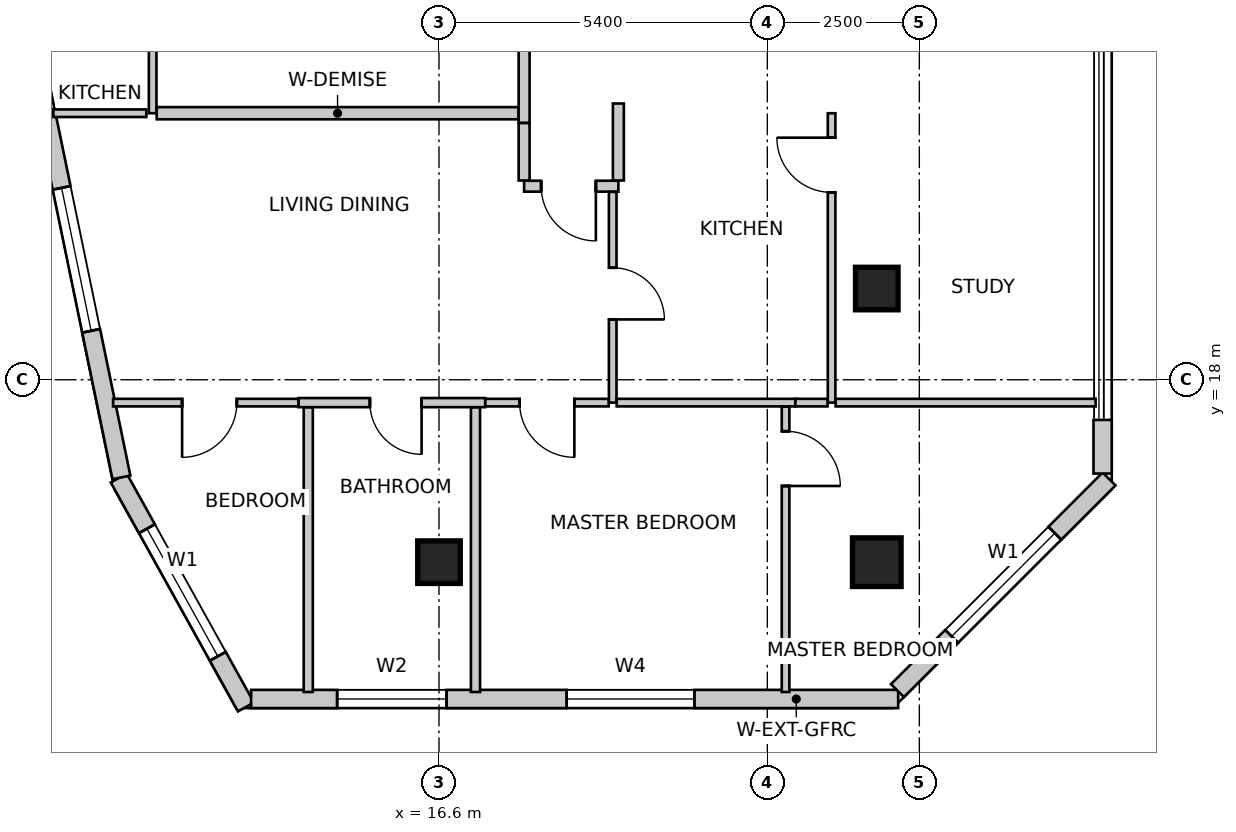
"""IFC4 building model, lengths in metres.
Left out: names, types, materials, properties, quantities, classifications, styles, units other than length and angle.
Written with IfcOpenShell. Run it as: python <this file> out.ifc"""

import sys

from ifc_helpers import new_model, si_unit, direction, frame, frame_2d, origin, origin_2d, place, context, subcontext, project, spatial, rectangle, extrude, source, transform, mapped, element, fill, save


model = new_model("IFC4")
c1 = context("Model", 3, precision=1e-05, world=origin(), true_north=direction((0.0, 1.0)))
c2 = subcontext(c1, "Body", "Model", "MODEL_VIEW")
j1 = project(units=[si_unit("LENGTHUNIT", "METRE"), si_unit("PLANEANGLEUNIT", "RADIAN")], contexts=[c1])
p1 = place(None, origin())
s1 = spatial("IfcSite", under=j1, at=p1, CompositionType="ELEMENT")
p2 = place(p1, origin())
s2 = spatial("IfcBuilding", under=s1, at=p2, CompositionType="ELEMENT")
p3 = place(p2, frame((0.0, 0.0, 218.4)))
s3 = spatial("IfcBuildingStorey", under=s2, at=p3, CompositionType="ELEMENT", Elevation=218.4)
m1 = source(origin(), c2, "Body", "SweptSolid", [
    extrude(rectangle(XDim=0.7, YDim=0.7, at=origin_2d()), origin(), (0.0, 0.0, 1.0), 3.5),
])
p4 = place(p3, frame((23.8, 19.5, 0.0), z_axis=(0.0, 0.0, 1.0), x_axis=(1.0, 0.0, 0.0)))
e1 = element("IfcColumn", 1, at=p4, inside=s3, PredefinedType="COLUMN", context=c2, shape_type="MappedRepresentation", body=[
    mapped(m1, transform((0.0, 0.0, 0.0), scale=1.0)),
])
m2 = source(origin(), c2, "Body", "SweptSolid", [
    extrude(rectangle(XDim=0.8, YDim=0.8, at=origin_2d()), origin(), (0.0, 0.0, 1.0), 3.5),
])
p5 = place(p3, frame((23.8, 15.0, 0.0), z_axis=(0.0, 0.0, 1.0), x_axis=(1.0, 0.0, 0.0)))
e2 = element("IfcColumn", 2, at=p5, inside=s3, PredefinedType="COLUMN", context=c2, shape_type="MappedRepresentation", body=[
    mapped(m2, transform((0.0, 0.0, 0.0), scale=1.0)),
])
p6 = place(p3, frame((16.6, 15.0, 0.0), z_axis=(0.0, 0.0, 1.0), x_axis=(1.0, 0.0, 0.0)))
e3 = element("IfcColumn", 3, at=p6, inside=s3, PredefinedType="COLUMN", context=c2, shape_type="MappedRepresentation", body=[
    mapped(m1, transform((0.0, 0.0, 0.0), scale=1.0)),
])
p7 = place(p3, frame((11.333, 16.384, 0.0), z_axis=(0.0, 0.0, 1.0), x_axis=(0.485633305139, -0.874162623852, 0.0)))
e4 = element("IfcWall", 4, at=p7, inside=s3, PredefinedType="SOLIDWALL", context=c2, shape_type="SweptSolid", body=[
    extrude(rectangle(XDim=4.307, YDim=0.3, at=frame_2d((2.153, 0.0))), origin(), (0.0, 0.0, 1.0), 3.25),
])
m3 = source(origin(), c2, "Body", "SweptSolid", [
    extrude(rectangle(XDim=2.4, YDim=2.2, at=frame_2d((1.2, 1.1))), frame((0.0, 0.16, 0.0), z_axis=(0.0, -1.0, 0.0), x_axis=(1.0, 0.0, 0.0)), (0.0, 0.0, 1.0), 0.32),
])
p8 = place(p7, frame((0.954, 0.0, 0.85)))
e5 = element("IfcOpeningElement", 5, at=p8, cuts=e4, PredefinedType="OPENING", context=c2, shape_type="MappedRepresentation", body=[
    mapped(m3, transform((0.0, 0.0, 0.0), scale=1.0)),
])
p9 = place(p3, frame((13.51, 12.75, 0.0), z_axis=(0.0, 0.0, 1.0), x_axis=(1.0, 0.0, 0.0)))
e6 = element("IfcWall", 6, at=p9, inside=s3, PredefinedType="SOLIDWALL", context=c2, shape_type="SweptSolid", body=[
    extrude(rectangle(XDim=10.642, YDim=0.3, at=frame_2d((5.321, 0.0))), origin(), (0.0, 0.0, 1.0), 3.25),
])
m4 = source(origin(), c2, "Body", "SweptSolid", [
    extrude(rectangle(XDim=1.8, YDim=2.1, at=frame_2d((0.9, 1.05))), frame((0.0, 0.16, 0.0), z_axis=(0.0, -1.0, 0.0), x_axis=(1.0, 0.0, 0.0)), (0.0, 0.0, 1.0), 0.32),
])
p10 = place(p9, frame((1.415, 0.0, 0.85)))
e7 = element("IfcOpeningElement", 7, at=p10, cuts=e6, PredefinedType="OPENING", context=c2, shape_type="MappedRepresentation", body=[
    mapped(m4, transform((0.0, 0.0, 0.0), scale=1.0)),
])
m5 = source(origin(), c2, "Body", "SweptSolid", [
    extrude(rectangle(XDim=2.1, YDim=2.0, at=frame_2d((1.05, 1.0))), frame((0.0, 0.16, 0.0), z_axis=(0.0, -1.0, 0.0), x_axis=(1.0, 0.0, 0.0)), (0.0, 0.0, 1.0), 0.32),
])
p11 = place(p9, frame((5.19, 0.0, 0.85)))
e8 = element("IfcOpeningElement", 8, at=p11, cuts=e6, PredefinedType="OPENING", context=c2, shape_type="MappedRepresentation", body=[
    mapped(m5, transform((0.0, 0.0, 0.0), scale=1.0)),
])
p12 = place(p3, frame((24.14, 12.888, 0.0), z_axis=(0.0, 0.0, 1.0), x_axis=(0.707106781187, 0.707106781187, 0.0)))
e9 = element("IfcWall", 9, at=p12, inside=s3, PredefinedType="SOLIDWALL", context=c2, shape_type="SweptSolid", body=[
    extrude(rectangle(XDim=4.922, YDim=0.3, at=frame_2d((2.461, 0.0))), origin(), (0.0, 0.0, 1.0), 3.25),
])
p13 = place(p12, frame((1.261, 0.0, 0.85)))
e10 = element("IfcOpeningElement", 10, at=p13, cuts=e9, PredefinedType="OPENING", context=c2, shape_type="MappedRepresentation", body=[
    mapped(m3, transform((0.0, 0.0, 0.0), scale=1.0)),
])
p14 = place(p3, frame((27.514, 16.457, 0.0), z_axis=(0.0, 0.0, 1.0), x_axis=(0.0, 1.0, 0.0)))
e11 = element("IfcWall", 11, at=p14, inside=s3, PredefinedType="SOLIDWALL", context=c2, shape_type="SweptSolid", body=[
    extrude(rectangle(XDim=0.882, YDim=0.3, at=frame_2d((0.441, 0.0))), origin(), (0.0, 0.0, 1.0), 3.25),
])
p15 = place(p3, frame((8.188, 31.834, 0.0), z_axis=(0.0, 0.0, 1.0), x_axis=(0.202303475707, -0.979322880217, 0.0)))
e12 = element("IfcWall", 12, at=p15, inside=s3, PredefinedType="SOLIDWALL", context=c2, shape_type="SweptSolid", body=[
    extrude(rectangle(XDim=15.766, YDim=0.3, at=frame_2d((7.883, 0.0))), origin(), (0.0, 0.0, 1.0), 3.25),
])
p16 = place(p15, frame((1.257, 0.0, 0.85)))
e13 = element("IfcOpeningElement", 13, at=p16, cuts=e12, PredefinedType="OPENING", context=c2, shape_type="MappedRepresentation", body=[
    mapped(m3, transform((0.0, 0.0, 0.0), scale=1.0)),
])
p17 = place(p15, frame((6.044, 0.0, 0.85)))
e14 = element("IfcOpeningElement", 14, at=p17, cuts=e12, PredefinedType="OPENING", context=c2, shape_type="MappedRepresentation", body=[
    mapped(m3, transform((0.0, 0.0, 0.0), scale=1.0)),
])
p18 = place(p15, frame((10.904, 0.0, 0.85)))
e15 = element("IfcOpeningElement", 15, at=p18, cuts=e12, PredefinedType="OPENING", context=c2, shape_type="MappedRepresentation", body=[
    mapped(m3, transform((0.0, 0.0, 0.0), scale=1.0)),
])
p19 = place(p3, frame((18.0, 22.223, 0.0), z_axis=(0.0, 0.0, 1.0), x_axis=(0.0, 1.0, 0.0)))
e16 = element("IfcWall", 16, at=p19, inside=s3, PredefinedType="PARTITIONING", context=c2, shape_type="SweptSolid", body=[
    extrude(rectangle(XDim=5.079, YDim=0.18, at=frame_2d((2.54, 0.0))), origin(), (0.0, 0.0, 1.0), 2.766),
])
m6 = source(origin(), c2, "Body", "SweptSolid", [
    extrude(rectangle(XDim=0.9, YDim=2.15, at=frame_2d((0.45, 1.075))), frame((0.0, 0.1, 0.0), z_axis=(0.0, -1.0, 0.0), x_axis=(1.0, 0.0, 0.0)), (0.0, 0.0, 1.0), 0.2),
])
p20 = place(p19, frame((2.09, 0.0, 0.0)))
e17 = element("IfcOpeningElement", 17, at=p20, cuts=e16, PredefinedType="OPENING", context=c2, shape_type="MappedRepresentation", body=[
    mapped(m6, transform((0.0, 0.0, 0.0), scale=1.0)),
])
p21 = place(p3, frame((19.55, 21.183, 0.0), z_axis=(0.0, 0.0, 1.0), x_axis=(-1.0, 0.0, 0.0)))
e18 = element("IfcWall", 18, at=p21, inside=s3, PredefinedType="PARTITIONING", context=c2, shape_type="SweptSolid", body=[
    extrude(rectangle(XDim=1.55, YDim=0.18, at=frame_2d((0.775, 0.0))), origin(), (0.0, 0.0, 1.0), 2.779),
])
p22 = place(p21, frame((0.37, 0.0, 0.0)))
e19 = element("IfcOpeningElement", 19, at=p22, cuts=e18, PredefinedType="OPENING", context=c2, shape_type="MappedRepresentation", body=[
    mapped(m6, transform((0.0, 0.0, 0.0), scale=1.0)),
])
p23 = place(p3, frame((18.0, 21.277, 0.0), z_axis=(0.0, 0.0, 1.0), x_axis=(0.0, 1.0, 0.0)))
e20 = element("IfcWall", 20, at=p23, inside=s3, PredefinedType="PARTITIONING", context=c2, shape_type="SweptSolid", body=[
    extrude(rectangle(XDim=0.944, YDim=0.18, at=frame_2d((0.472, 0.0))), origin(), (0.0, 0.0, 1.0), 2.779),
])
p24 = place(p3, frame((19.55, 22.543, 0.0), z_axis=(0.0, 0.0, 1.0), x_axis=(0.0, -1.0, 0.0)))
e21 = element("IfcWall", 21, at=p24, inside=s3, PredefinedType="PARTITIONING", context=c2, shape_type="SweptSolid", body=[
    extrude(rectangle(XDim=1.266, YDim=0.18, at=frame_2d((0.633, 0.0))), origin(), (0.0, 0.0, 1.0), 3.25),
])
p25 = place(p3, frame((11.891, 22.383, 0.0), z_axis=(0.0, 0.0, 1.0), x_axis=(0.0, 1.0, 0.0)))
e22 = element("IfcWall", 22, at=p25, inside=s3, PredefinedType="PARTITIONING", context=c2, shape_type="SweptSolid", body=[
    extrude(rectangle(XDim=4.759, YDim=0.125, at=frame_2d((2.379, 0.0))), origin(), (0.0, 0.0, 1.0), 2.766),
])
m7 = source(origin(), c2, "Body", "SweptSolid", [
    extrude(rectangle(XDim=0.85, YDim=2.15, at=frame_2d((0.425, 1.075))), frame((0.0, 0.073, 0.0), z_axis=(0.0, -1.0, 0.0), x_axis=(1.0, 0.0, 0.0)), (0.0, 0.0, 1.0), 0.145),
])
p26 = place(p25, frame((3.257, 0.0, 0.0)))
e23 = element("IfcOpeningElement", 23, at=p26, cuts=e22, PredefinedType="OPENING", context=c2, shape_type="MappedRepresentation", body=[
    mapped(m7, transform((0.0, 0.0, 0.0), scale=1.0)),
])
p27 = place(p3, frame((17.906, 22.383, 0.0), z_axis=(0.0, 0.0, 1.0), x_axis=(-1.0, 0.0, 0.0)))
e24 = element("IfcWall", 24, at=p27, inside=s3, PredefinedType="PARTITIONING", context=c2, shape_type="SweptSolid", body=[
    extrude(rectangle(XDim=5.948, YDim=0.2, at=frame_2d((2.974, 0.0))), origin(), (0.0, 0.0, 1.0), 2.779),
])
p28 = place(p3, frame((11.787, 22.383, 0.0), z_axis=(0.0, 0.0, 1.0), x_axis=(-1.0, 0.0, 0.0)))
e25 = element("IfcWall", 25, at=p28, inside=s3, PredefinedType="PARTITIONING", context=c2, shape_type="SweptSolid", body=[
    extrude(rectangle(XDim=1.53, YDim=0.125, at=frame_2d((0.765, 0.0))), origin(), (0.0, 0.0, 1.0), 3.25),
])
p29 = place(p3, frame((23.057, 17.624, 0.0), z_axis=(0.0, 0.0, 1.0), x_axis=(0.0, 1.0, 0.0)))
e26 = element("IfcWall", 26, at=p29, inside=s3, PredefinedType="PARTITIONING", context=c2, shape_type="SweptSolid", body=[
    extrude(rectangle(XDim=4.759, YDim=0.125, at=frame_2d((2.379, 0.0))), origin(), (0.0, 0.0, 1.0), 2.779),
])
m8 = source(origin(), c2, "Body", "SweptSolid", [
    extrude(rectangle(XDim=0.9, YDim=2.15, at=frame_2d((0.45, 1.075))), frame((0.0, 0.073, 0.0), z_axis=(0.0, -1.0, 0.0), x_axis=(1.0, 0.0, 0.0)), (0.0, 0.0, 1.0), 0.145),
])
p30 = place(p29, frame((3.457, 0.0, 0.0)))
e27 = element("IfcOpeningElement", 27, at=p30, cuts=e26, PredefinedType="OPENING", context=c2, shape_type="MappedRepresentation", body=[
    mapped(m8, transform((0.0, 0.0, 0.0), scale=1.0)),
])
p31 = place(p3, frame((27.399, 17.624, 0.0), z_axis=(0.0, 0.0, 1.0), x_axis=(-1.0, 0.0, 0.0)))
e28 = element("IfcWall", 28, at=p31, inside=s3, PredefinedType="PARTITIONING", context=c2, shape_type="SweptSolid", body=[
    extrude(rectangle(XDim=4.275, YDim=0.125, at=frame_2d((2.138, 0.0))), origin(), (0.0, 0.0, 1.0), 2.542),
])
p32 = place(p3, frame((19.457, 21.089, 0.0), z_axis=(0.0, 0.0, 1.0), x_axis=(0.0, -1.0, 0.0)))
e29 = element("IfcWall", 29, at=p32, inside=s3, PredefinedType="PARTITIONING", context=c2, shape_type="SweptSolid", body=[
    extrude(rectangle(XDim=3.465, YDim=0.125, at=frame_2d((1.732, 0.0))), origin(), (0.0, 0.0, 1.0), 2.779),
])
p33 = place(p32, frame((1.247, 0.0, 0.0)))
e30 = element("IfcOpeningElement", 30, at=p33, cuts=e29, PredefinedType="OPENING", context=c2, shape_type="MappedRepresentation", body=[
    mapped(m7, transform((0.0, 0.0, 0.0), scale=1.0)),
])
p34 = place(p3, frame((17.36, 17.624, 0.0), z_axis=(0.0, 0.0, 1.0), x_axis=(-1.0, 0.0, 0.0)))
e31 = element("IfcWall", 31, at=p34, inside=s3, PredefinedType="PARTITIONING", context=c2, shape_type="SweptSolid", body=[
    extrude(rectangle(XDim=3.07, YDim=0.15, at=frame_2d((1.535, 0.0))), origin(), (0.0, 0.0, 1.0), 3.25),
])
m9 = source(origin(), c2, "Body", "SweptSolid", [
    extrude(rectangle(XDim=0.85, YDim=2.15, at=frame_2d((0.425, 1.075))), frame((0.0, 0.085, 0.0), z_axis=(0.0, -1.0, 0.0), x_axis=(1.0, 0.0, 0.0)), (0.0, 0.0, 1.0), 0.17),
])
p35 = place(p34, frame((1.046, 0.0, 0.0)))
e32 = element("IfcOpeningElement", 32, at=p35, cuts=e31, PredefinedType="OPENING", context=c2, shape_type="MappedRepresentation", body=[
    mapped(m9, transform((0.0, 0.0, 0.0), scale=1.0)),
])
p36 = place(p3, frame((14.288, 17.624, 0.0), z_axis=(0.0, 0.0, 1.0), x_axis=(-1.0, 0.0, 0.0)))
e33 = element("IfcWall", 33, at=p36, inside=s3, PredefinedType="PARTITIONING", context=c2, shape_type="SweptSolid", body=[
    extrude(rectangle(XDim=3.048, YDim=0.125, at=frame_2d((1.524, 0.0))), origin(), (0.0, 0.0, 1.0), 3.25),
])
p37 = place(p36, frame((1.013, 0.0, 0.0)))
e34 = element("IfcOpeningElement", 34, at=p37, cuts=e33, PredefinedType="OPENING", context=c2, shape_type="MappedRepresentation", body=[
    mapped(m8, transform((0.0, 0.0, 0.0), scale=1.0)),
])
p38 = place(p3, frame((19.39, 17.624, 0.0), z_axis=(0.0, 0.0, 1.0), x_axis=(-1.0, 0.0, 0.0)))
e35 = element("IfcWall", 35, at=p38, inside=s3, PredefinedType="PARTITIONING", context=c2, shape_type="SweptSolid", body=[
    extrude(rectangle(XDim=2.028, YDim=0.125, at=frame_2d((1.014, 0.0))), origin(), (0.0, 0.0, 1.0), 3.25),
])
p39 = place(p38, frame((0.564, 0.0, 0.0)))
e36 = element("IfcOpeningElement", 36, at=p39, cuts=e35, PredefinedType="OPENING", context=c2, shape_type="MappedRepresentation", body=[
    mapped(m8, transform((0.0, 0.0, 0.0), scale=1.0)),
])
p40 = place(p3, frame((22.46, 17.624, 0.0), z_axis=(0.0, 0.0, 1.0), x_axis=(-1.0, 0.0, 0.0)))
e37 = element("IfcWall", 37, at=p40, inside=s3, PredefinedType="PARTITIONING", context=c2, shape_type="SweptSolid", body=[
    extrude(rectangle(XDim=2.937, YDim=0.125, at=frame_2d((1.468, 0.0))), origin(), (0.0, 0.0, 1.0), 2.779),
])
p41 = place(p3, frame((22.99, 17.624, 0.0), z_axis=(0.0, 0.0, 1.0), x_axis=(-1.0, 0.0, 0.0)))
e38 = element("IfcWall", 38, at=p41, inside=s3, PredefinedType="PARTITIONING", context=c2, shape_type="SweptSolid", body=[
    extrude(rectangle(XDim=0.529, YDim=0.125, at=frame_2d((0.264, 0.0))), origin(), (0.0, 0.0, 1.0), 3.25),
])
p42 = place(p3, frame((14.45, 12.865, 0.0), z_axis=(0.0, 0.0, 1.0), x_axis=(0.0, 1.0, 0.0)))
e39 = element("IfcWall", 39, at=p42, inside=s3, PredefinedType="PARTITIONING", context=c2, shape_type="SweptSolid", body=[
    extrude(rectangle(XDim=4.68, YDim=0.15, at=frame_2d((2.34, 0.0))), origin(), (0.0, 0.0, 1.0), 3.25),
])
p43 = place(p3, frame((17.2, 17.545, 0.0), z_axis=(0.0, 0.0, 1.0), x_axis=(0.0, -1.0, 0.0)))
e40 = element("IfcWall", 40, at=p43, inside=s3, PredefinedType="PARTITIONING", context=c2, shape_type="SweptSolid", body=[
    extrude(rectangle(XDim=4.68, YDim=0.15, at=frame_2d((2.34, 0.0))), origin(), (0.0, 0.0, 1.0), 2.542),
])
p44 = place(p3, frame((22.3, 17.558, 0.0), z_axis=(0.0, 0.0, 1.0), x_axis=(0.0, -1.0, 0.0)))
e41 = element("IfcWall", 41, at=p44, inside=s3, PredefinedType="PARTITIONING", context=c2, shape_type="SweptSolid", body=[
    extrude(rectangle(XDim=4.693, YDim=0.125, at=frame_2d((2.346, 0.0))), origin(), (0.0, 0.0, 1.0), 2.542),
])
p45 = place(p44, frame((0.404, 0.0, 0.0)))
e42 = element("IfcOpeningElement", 42, at=p45, cuts=e41, PredefinedType="OPENING", context=c2, shape_type="MappedRepresentation", body=[
    mapped(m8, transform((0.0, 0.0, 0.0), scale=1.0)),
])
m10 = source(origin(), c2, "Body", "SweptSolid", [
    extrude(rectangle(XDim=2.4, YDim=2.2, at=frame_2d((1.2, 1.1))), frame((0.0, -0.015, 0.0), z_axis=(0.0, -1.0, 0.0), x_axis=(1.0, 0.0, 0.0)), (0.0, 0.0, 1.0), 0.06),
])
p46 = place(p8, origin())
e43 = element("IfcWindow", 43, at=p46, inside=s3, PartitioningType="SINGLE_PANEL", PredefinedType="WINDOW", context=c2, shape_type="MappedRepresentation", body=[
    mapped(m10, transform((0.0, 0.0, 0.0), scale=1.0)),
])
fill(e5, e43)
m11 = source(origin(), c2, "Body", "SweptSolid", [
    extrude(rectangle(XDim=1.8, YDim=2.1, at=frame_2d((0.9, 1.05))), frame((0.0, -0.015, 0.0), z_axis=(0.0, -1.0, 0.0), x_axis=(1.0, 0.0, 0.0)), (0.0, 0.0, 1.0), 0.06),
])
p47 = place(p10, origin())
e44 = element("IfcWindow", 44, at=p47, inside=s3, PartitioningType="SINGLE_PANEL", PredefinedType="WINDOW", context=c2, shape_type="MappedRepresentation", body=[
    mapped(m11, transform((0.0, 0.0, 0.0), scale=1.0)),
])
fill(e7, e44)
m12 = source(origin(), c2, "Body", "SweptSolid", [
    extrude(rectangle(XDim=2.1, YDim=2.0, at=frame_2d((1.05, 1.0))), frame((0.0, -0.015, 0.0), z_axis=(0.0, -1.0, 0.0), x_axis=(1.0, 0.0, 0.0)), (0.0, 0.0, 1.0), 0.06),
])
p48 = place(p11, origin())
e45 = element("IfcWindow", 45, at=p48, inside=s3, PartitioningType="SINGLE_PANEL", PredefinedType="WINDOW", context=c2, shape_type="MappedRepresentation", body=[
    mapped(m12, transform((0.0, 0.0, 0.0), scale=1.0)),
])
fill(e8, e45)
p49 = place(p13, origin())
e46 = element("IfcWindow", 46, at=p49, inside=s3, PartitioningType="SINGLE_PANEL", PredefinedType="WINDOW", context=c2, shape_type="MappedRepresentation", body=[
    mapped(m10, transform((0.0, 0.0, 0.0), scale=1.0)),
])
fill(e10, e46)
p50 = place(p18, origin())
e47 = element("IfcWindow", 47, at=p50, inside=s3, PartitioningType="SINGLE_PANEL", PredefinedType="WINDOW", context=c2, shape_type="MappedRepresentation", body=[
    mapped(m10, transform((0.0, 0.0, 0.0), scale=1.0)),
])
fill(e15, e47)
m13 = source(origin(), c2, "Body", "SweptSolid", [
    extrude(rectangle(XDim=0.9, YDim=2.15, at=frame_2d((0.45, 1.075))), frame((0.0, 0.025, 0.0), z_axis=(0.0, -1.0, 0.0), x_axis=(1.0, 0.0, 0.0)), (0.0, 0.0, 1.0), 0.05),
])
p51 = place(p30, origin())
e48 = element("IfcDoor", 48, at=p51, inside=s3, OperationType="SINGLE_SWING_RIGHT", PredefinedType="DOOR", context=c2, shape_type="MappedRepresentation", body=[
    mapped(m13, transform((0.0, 0.0, 0.0), scale=1.0)),
])
fill(e27, e48)
m14 = source(origin(), c2, "Body", "SweptSolid", [
    extrude(rectangle(XDim=0.9, YDim=2.15, at=frame_2d((0.45, 1.075))), frame((0.0, 0.025, 0.0), z_axis=(0.0, -1.0, 0.0), x_axis=(1.0, 0.0, 0.0)), (0.0, 0.0, 1.0), 0.05),
])
p52 = place(p22, origin())
e49 = element("IfcDoor", 49, at=p52, inside=s3, OperationType="SINGLE_SWING_LEFT", PredefinedType="DOOR", context=c2, shape_type="MappedRepresentation", body=[
    mapped(m14, transform((0.0, 0.0, 0.0), scale=1.0)),
])
fill(e19, e49)
m15 = source(origin(), c2, "Body", "SweptSolid", [
    extrude(rectangle(XDim=0.85, YDim=2.15, at=frame_2d((0.425, 1.075))), frame((0.0, 0.025, 0.0), z_axis=(0.0, -1.0, 0.0), x_axis=(1.0, 0.0, 0.0)), (0.0, 0.0, 1.0), 0.05),
])
p53 = place(p33, origin())
e50 = element("IfcDoor", 50, at=p53, inside=s3, OperationType="SINGLE_SWING_RIGHT", PredefinedType="DOOR", context=c2, shape_type="MappedRepresentation", body=[
    mapped(m15, transform((0.0, 0.0, 0.0), scale=1.0)),
])
fill(e30, e50)
p54 = place(p35, origin())
e51 = element("IfcDoor", 51, at=p54, inside=s3, OperationType="SINGLE_SWING_LEFT", PredefinedType="DOOR", context=c2, shape_type="MappedRepresentation", body=[
    mapped(m15, transform((0.0, 0.0, 0.0), scale=1.0)),
])
fill(e32, e51)
p55 = place(p37, origin())
e52 = element("IfcDoor", 52, at=p55, inside=s3, OperationType="SINGLE_SWING_RIGHT", PredefinedType="DOOR", context=c2, shape_type="MappedRepresentation", body=[
    mapped(m13, transform((0.0, 0.0, 0.0), scale=1.0)),
])
fill(e34, e52)
p56 = place(p39, origin())
e53 = element("IfcDoor", 53, at=p56, inside=s3, OperationType="SINGLE_SWING_LEFT", PredefinedType="DOOR", context=c2, shape_type="MappedRepresentation", body=[
    mapped(m13, transform((0.0, 0.0, 0.0), scale=1.0)),
])
fill(e36, e53)
p57 = place(p45, origin())
e54 = element("IfcDoor", 54, at=p57, inside=s3, OperationType="SINGLE_SWING_RIGHT", PredefinedType="DOOR", context=c2, shape_type="MappedRepresentation", body=[
    mapped(m13, transform((0.0, 0.0, 0.0), scale=1.0)),
])
fill(e42, e54)
save(model, sys.argv[1])
